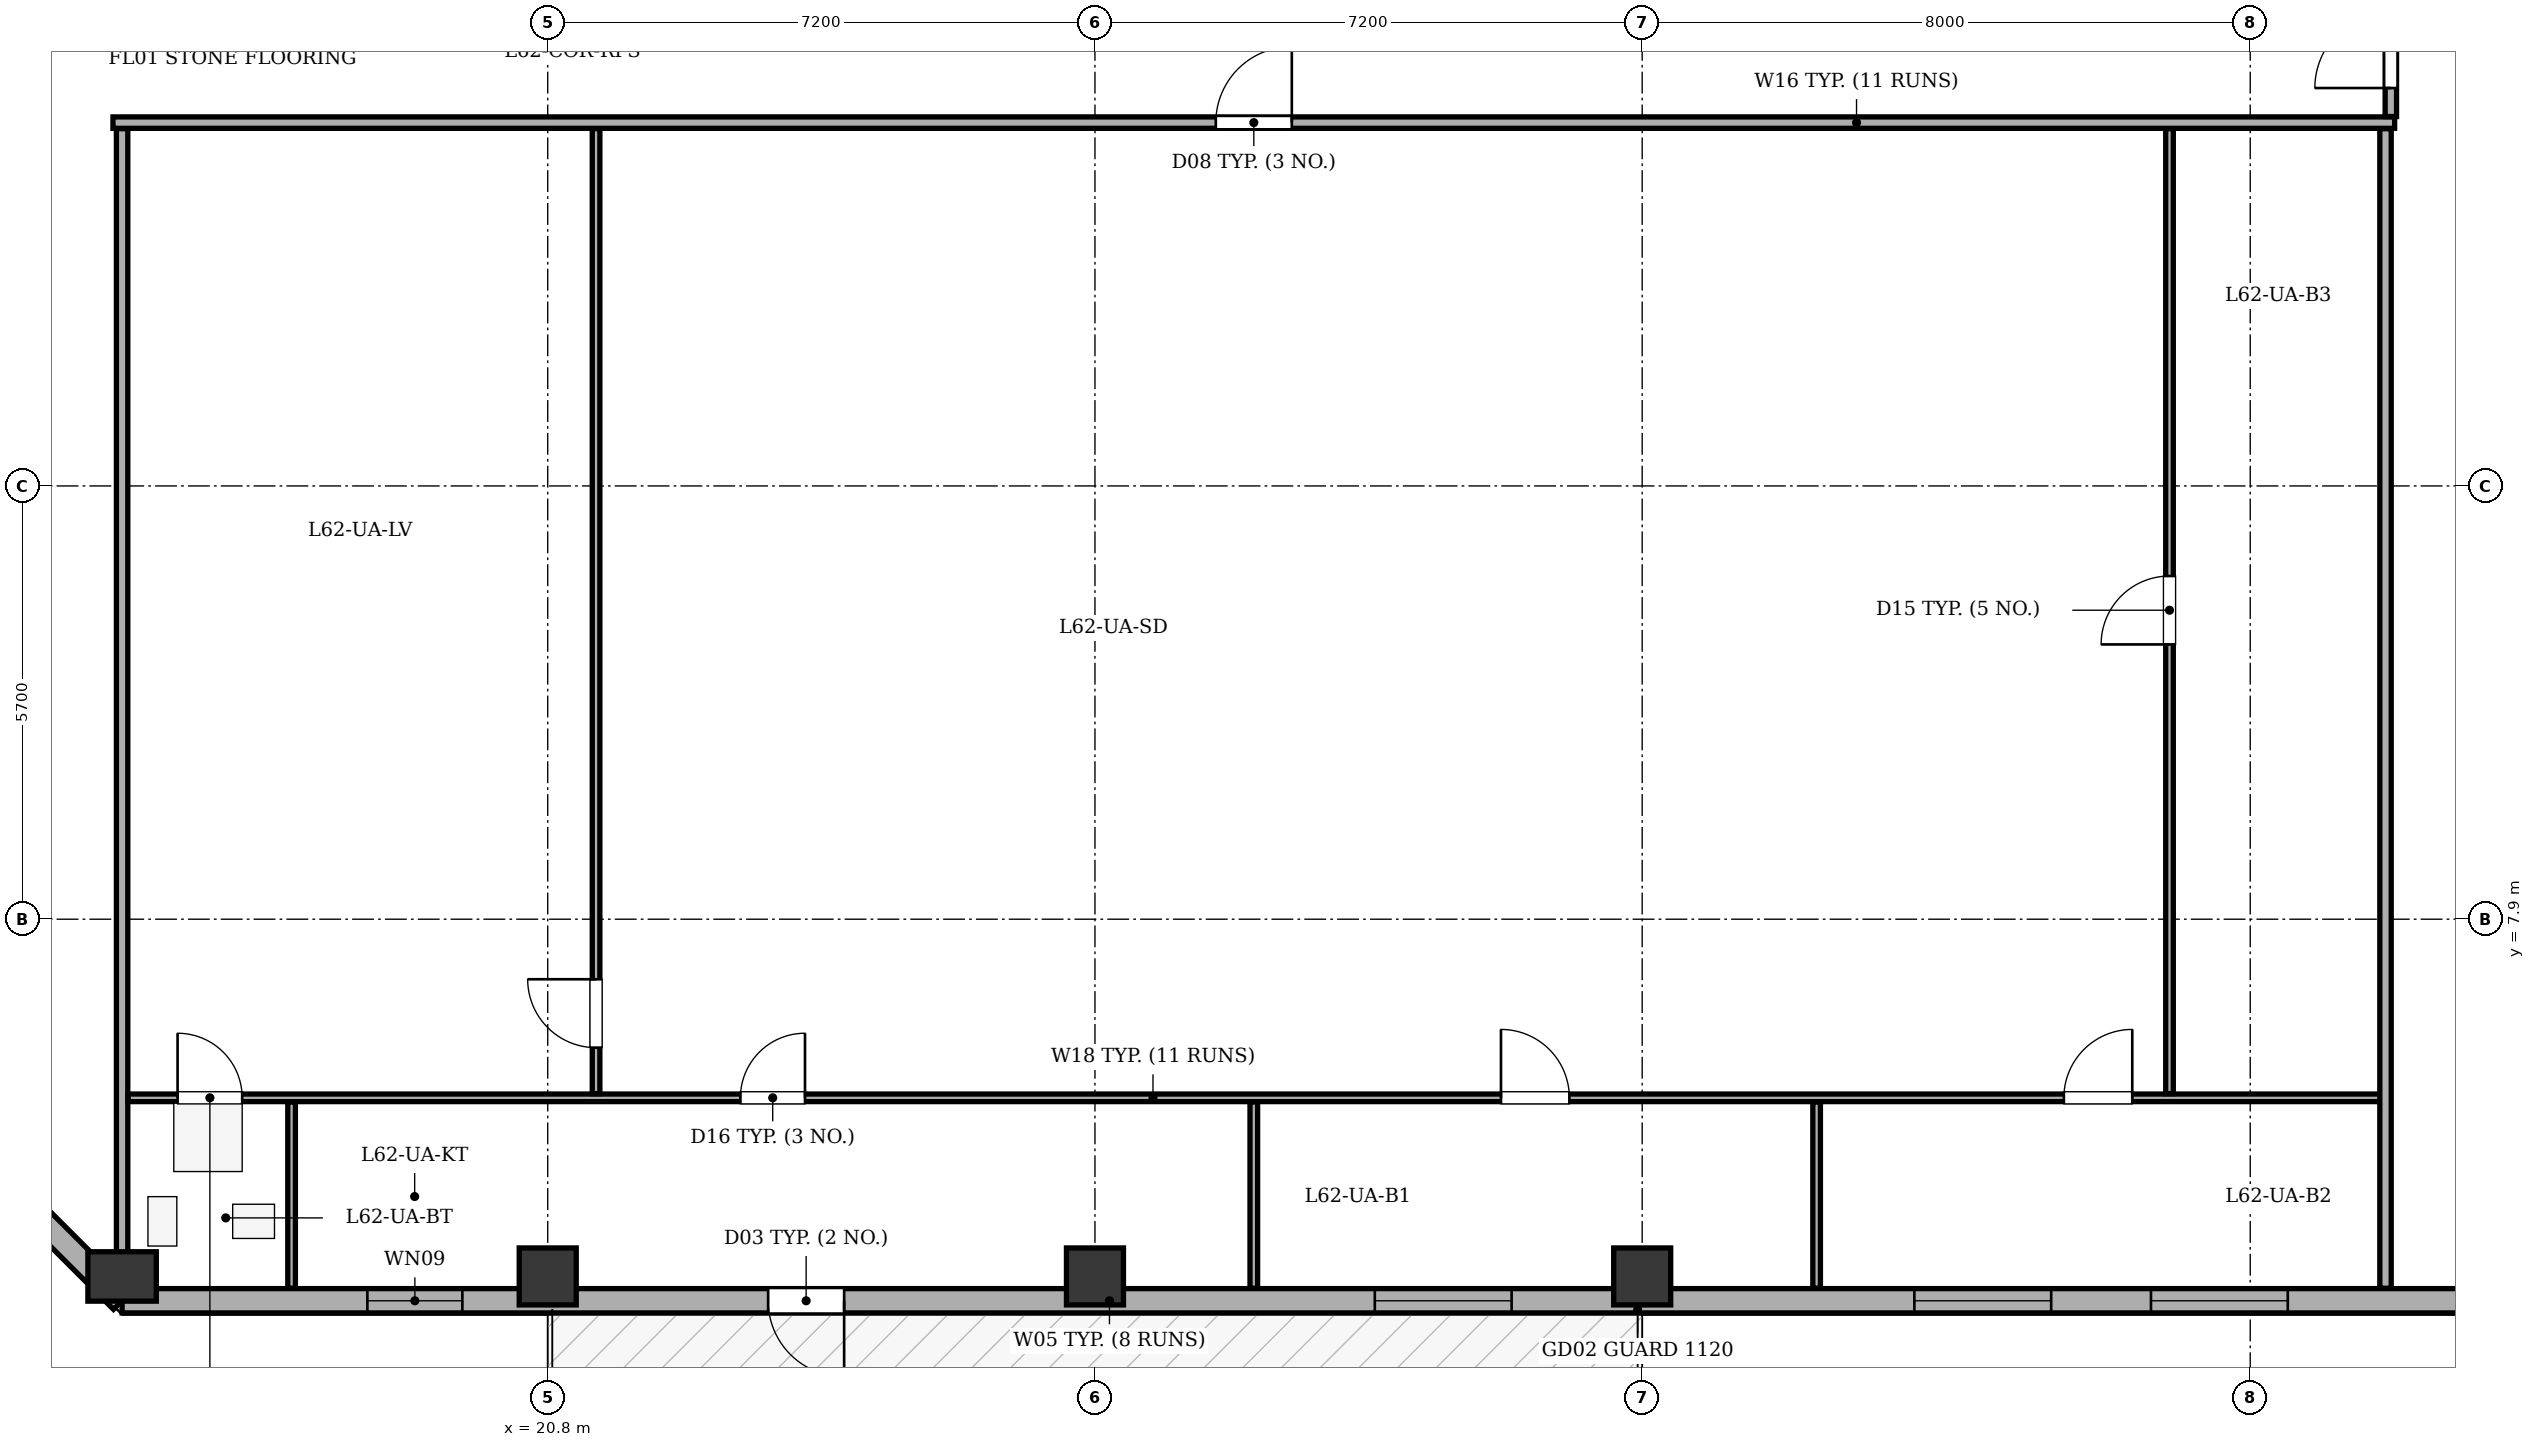
"""IFC4 building model, lengths in metres.
Left out: names, types, materials, properties, quantities, classifications, styles, units other than length and angle.
Written with IfcOpenShell. Run it as: python <this file> out.ifc"""

import sys

from ifc_helpers import new_model, si_unit, direction, frame, frame_2d, origin, origin_2d, place, context, subcontext, project, spatial, rectangle, extrude, element, fill, save


model = new_model("IFC4")
c1 = context("Model", 3, precision=1e-05, world=origin(), true_north=direction((0.0, 1.0)))
c2 = subcontext(c1, "Body", "Model", "MODEL_VIEW")
j1 = project(units=[si_unit("LENGTHUNIT", "METRE"), si_unit("PLANEANGLEUNIT", "RADIAN")], contexts=[c1])
p1 = place(None, origin())
s1 = spatial("IfcSite", under=j1, at=p1, CompositionType="ELEMENT")
p2 = place(p1, origin())
s2 = spatial("IfcBuilding", under=s1, at=p2, CompositionType="ELEMENT")
p3 = place(p2, frame((0.0, 0.0, 238.1)))
s3 = spatial("IfcBuildingStorey", under=s2, at=p3, CompositionType="ELEMENT", Elevation=238.1)
p4 = place(p3, frame((15.2, 3.2, 0.0), z_axis=(0.0, 0.0, 1.0), x_axis=(1.0, 0.0, 0.0)))
e1 = element("IfcColumn", 1, at=p4, inside=s3, PredefinedType="COLUMN", context=c2, shape_type="SweptSolid", body=[
    extrude(rectangle(XDim=0.65, YDim=0.9, at=origin_2d()), origin(), (0.0, 0.0, 1.0), 3.4),
])
for number, where, z_axis, x_axis in (
    (2, (20.8, 3.2, 0.0), (0.0, 0.0, 1.0), (1.0, 0.0, 0.0)),
    (3, (28.0, 3.2, 0.0), (0.0, 0.0, 1.0), (1.0, 0.0, 0.0)),
    (4, (35.2, 3.2, 0.0), (0.0, 0.0, 1.0), (1.0, 0.0, 0.0)),
):
    element("IfcColumn", number, at=place(p3, frame(where, z_axis=z_axis, x_axis=x_axis)), inside=s3, PredefinedType="COLUMN", context=c2, shape_type="SweptSolid", body=[
        extrude(rectangle(XDim=0.75, YDim=0.75, at=origin_2d()), origin(), (0.0, 0.0, 1.0), 3.4),
    ])
p5 = place(p3, frame((51.2, 2.88, 0.0), z_axis=(0.0, 0.0, 1.0), x_axis=(-1.0, 0.0, 0.0)))
e5 = element("IfcWall", 5, at=p5, inside=s3, PredefinedType="STANDARD", context=c2, shape_type="SweptSolid", body=[
    extrude(rectangle(XDim=36.0, YDim=0.32, at=frame_2d((18.0, 0.0))), origin(), (0.0, 0.0, 1.0), 2.725),
])
p6 = place(p5, frame((26.5, 0.0, 0.0)))
e6 = element("IfcOpeningElement", 6, at=p6, cuts=e5, PredefinedType="OPENING", context=c2, shape_type="SweptSolid", body=[
    extrude(rectangle(XDim=1.0, YDim=2.02, at=frame_2d((0.5, 1.01))), frame((0.0, 0.17, 0.0), z_axis=(0.0, -1.0, 0.0), x_axis=(1.0, 0.0, 0.0)), (0.0, 0.0, 1.0), 0.34),
])
p7 = place(p5, frame((2.31, 0.0, 0.75)))
e7 = element("IfcOpeningElement", 7, at=p7, cuts=e5, PredefinedType="OPENING", context=c2, shape_type="SweptSolid", body=[
    extrude(rectangle(XDim=1.8, YDim=1.7, at=frame_2d((0.9, 0.85))), frame((0.0, 0.17, 0.0), z_axis=(0.0, -1.0, 0.0), x_axis=(1.0, 0.0, 0.0)), (0.0, 0.0, 1.0), 0.34),
])
p8 = place(p5, frame((7.506, 0.0, 0.75)))
e8 = element("IfcOpeningElement", 8, at=p8, cuts=e5, PredefinedType="OPENING", context=c2, shape_type="SweptSolid", body=[
    extrude(rectangle(XDim=1.8, YDim=1.7, at=frame_2d((0.9, 0.85))), frame((0.0, 0.17, 0.0), z_axis=(0.0, -1.0, 0.0), x_axis=(1.0, 0.0, 0.0)), (0.0, 0.0, 1.0), 0.34),
])
p9 = place(p5, frame((10.619, 0.0, 0.75)))
e9 = element("IfcOpeningElement", 9, at=p9, cuts=e5, PredefinedType="OPENING", context=c2, shape_type="SweptSolid", body=[
    extrude(rectangle(XDim=1.8, YDim=1.7, at=frame_2d((0.9, 0.85))), frame((0.0, 0.17, 0.0), z_axis=(0.0, -1.0, 0.0), x_axis=(1.0, 0.0, 0.0)), (0.0, 0.0, 1.0), 0.34),
])
p10 = place(p5, frame((17.718, 0.0, 0.75)))
e10 = element("IfcOpeningElement", 10, at=p10, cuts=e5, PredefinedType="OPENING", context=c2, shape_type="SweptSolid", body=[
    extrude(rectangle(XDim=1.8, YDim=1.7, at=frame_2d((0.9, 0.85))), frame((0.0, 0.17, 0.0), z_axis=(0.0, -1.0, 0.0), x_axis=(1.0, 0.0, 0.0)), (0.0, 0.0, 1.0), 0.34),
])
p11 = place(p5, frame((31.523, 0.0, 0.75)))
e11 = element("IfcOpeningElement", 11, at=p11, cuts=e5, PredefinedType="OPENING", context=c2, shape_type="SweptSolid", body=[
    extrude(rectangle(XDim=1.25, YDim=1.7, at=frame_2d((0.625, 0.85))), frame((0.0, 0.17, 0.0), z_axis=(0.0, -1.0, 0.0), x_axis=(1.0, 0.0, 0.0)), (0.0, 0.0, 1.0), 0.34),
])
p12 = place(p3, frame((15.2, 2.88, 0.0), z_axis=(0.0, 0.0, 1.0), x_axis=(-0.707106781187, 0.707106781187, 0.0)))
e12 = element("IfcWall", 12, at=p12, inside=s3, PredefinedType="STANDARD", context=c2, shape_type="SweptSolid", body=[
    extrude(rectangle(XDim=6.11, YDim=0.32, at=frame_2d((3.055, 0.0))), origin(), (0.0, 0.0, 1.0), 2.725),
])
p13 = place(p12, frame((2.355, 0.0, 0.75)))
e13 = element("IfcOpeningElement", 13, at=p13, cuts=e12, PredefinedType="OPENING", context=c2, shape_type="SweptSolid", body=[
    extrude(rectangle(XDim=1.4, YDim=1.65, at=frame_2d((0.7, 0.825))), frame((0.0, 0.17, 0.0), z_axis=(0.0, -1.0, 0.0), x_axis=(1.0, 0.0, 0.0)), (0.0, 0.0, 1.0), 0.34),
])
p14 = place(p3, frame((15.08, 18.38, 0.0), z_axis=(0.0, 0.0, 1.0), x_axis=(1.0, 0.0, 0.0)))
e14 = element("IfcWall", 14, at=p14, inside=s3, PredefinedType="PARTITIONING", context=c2, shape_type="SweptSolid", body=[
    extrude(rectangle(XDim=30.02, YDim=0.15, at=frame_2d((15.01, 0.0))), origin(), (0.0, 0.0, 1.0), 3.1),
])
p15 = place(p14, frame((14.51, 0.0, 0.0)))
e15 = element("IfcOpeningElement", 15, at=p15, cuts=e14, PredefinedType="OPENING", context=c2, shape_type="SweptSolid", body=[
    extrude(rectangle(XDim=1.0, YDim=2.1, at=frame_2d((0.5, 1.05))), frame((0.0, 0.085, 0.0), z_axis=(0.0, -1.0, 0.0), x_axis=(1.0, 0.0, 0.0)), (0.0, 0.0, 1.0), 0.17),
])
p16 = place(p3, frame((15.2, 3.045, 0.0), z_axis=(0.0, 0.0, 1.0), x_axis=(0.0, 1.0, 0.0)))
e16 = element("IfcWall", 16, at=p16, inside=s3, PredefinedType="PARTITIONING", context=c2, shape_type="SweptSolid", body=[
    extrude(rectangle(XDim=15.255, YDim=0.15, at=frame_2d((7.627, 0.0))), origin(), (0.0, 0.0, 1.0), 3.1),
])
p17 = place(p3, frame((15.28, 5.55, 0.0), z_axis=(0.0, 0.0, 1.0), x_axis=(1.0, 0.0, 0.0)))
e17 = element("IfcWall", 17, at=p17, inside=s3, PredefinedType="PARTITIONING", context=c2, shape_type="SweptSolid", body=[
    extrude(rectangle(XDim=29.74, YDim=0.1, at=frame_2d((14.87, 0.0))), origin(), (0.0, 0.0, 1.0), 3.1),
])
p18 = place(p17, frame((0.65, 0.0, 0.0)))
e18 = element("IfcOpeningElement", 18, at=p18, cuts=e17, PredefinedType="OPENING", context=c2, shape_type="SweptSolid", body=[
    extrude(rectangle(XDim=0.85, YDim=2.05, at=frame_2d((0.425, 1.025))), frame((0.0, 0.06, 0.0), z_axis=(0.0, -1.0, 0.0), x_axis=(1.0, 0.0, 0.0)), (0.0, 0.0, 1.0), 0.12),
])
p19 = place(p17, frame((8.055, 0.0, 0.0)))
e19 = element("IfcOpeningElement", 19, at=p19, cuts=e17, PredefinedType="OPENING", context=c2, shape_type="SweptSolid", body=[
    extrude(rectangle(XDim=0.85, YDim=2.05, at=frame_2d((0.425, 1.025))), frame((0.0, 0.06, 0.0), z_axis=(0.0, -1.0, 0.0), x_axis=(1.0, 0.0, 0.0)), (0.0, 0.0, 1.0), 0.12),
])
p20 = place(p17, frame((18.062, 0.0, 0.0)))
e20 = element("IfcOpeningElement", 20, at=p20, cuts=e17, PredefinedType="OPENING", context=c2, shape_type="SweptSolid", body=[
    extrude(rectangle(XDim=0.9, YDim=2.05, at=frame_2d((0.45, 1.025))), frame((0.0, 0.06, 0.0), z_axis=(0.0, -1.0, 0.0), x_axis=(1.0, 0.0, 0.0)), (0.0, 0.0, 1.0), 0.12),
])
p21 = place(p17, frame((25.468, 0.0, 0.0)))
e21 = element("IfcOpeningElement", 21, at=p21, cuts=e17, PredefinedType="OPENING", context=c2, shape_type="SweptSolid", body=[
    extrude(rectangle(XDim=0.9, YDim=2.05, at=frame_2d((0.45, 1.025))), frame((0.0, 0.06, 0.0), z_axis=(0.0, -1.0, 0.0), x_axis=(1.0, 0.0, 0.0)), (0.0, 0.0, 1.0), 0.12),
])
p22 = place(p3, frame((42.138, 5.605, 0.0), z_axis=(0.0, 0.0, 1.0), x_axis=(0.0, 1.0, 0.0)))
e22 = element("IfcWall", 22, at=p22, inside=s3, PredefinedType="PARTITIONING", context=c2, shape_type="SweptSolid", body=[
    extrude(rectangle(XDim=12.695, YDim=0.1, at=frame_2d((6.348, 0.0))), origin(), (0.0, 0.0, 1.0), 2.725),
])
p23 = place(p22, frame((5.91, 0.0, 0.0)))
e23 = element("IfcOpeningElement", 23, at=p23, cuts=e22, PredefinedType="OPENING", context=c2, shape_type="SweptSolid", body=[
    extrude(rectangle(XDim=0.9, YDim=2.05, at=frame_2d((0.45, 1.025))), frame((0.0, 0.06, 0.0), z_axis=(0.0, -1.0, 0.0), x_axis=(1.0, 0.0, 0.0)), (0.0, 0.0, 1.0), 0.12),
])
p24 = place(p3, frame((21.436, 5.605, 0.0), z_axis=(0.0, 0.0, 1.0), x_axis=(0.0, 1.0, 0.0)))
e24 = element("IfcWall", 24, at=p24, inside=s3, PredefinedType="PARTITIONING", context=c2, shape_type="SweptSolid", body=[
    extrude(rectangle(XDim=12.695, YDim=0.1, at=frame_2d((6.348, 0.0))), origin(), (0.0, 0.0, 1.0), 3.1),
])
p25 = place(p24, frame((0.605, 0.0, 0.0)))
e25 = element("IfcOpeningElement", 25, at=p25, cuts=e24, PredefinedType="OPENING", context=c2, shape_type="SweptSolid", body=[
    extrude(rectangle(XDim=0.9, YDim=2.05, at=frame_2d((0.45, 1.025))), frame((0.0, 0.06, 0.0), z_axis=(0.0, -1.0, 0.0), x_axis=(1.0, 0.0, 0.0)), (0.0, 0.0, 1.0), 0.12),
])
for number, where, z_axis, x_axis in (
    (26, (17.43, 3.045, 0.0), (0.0, 0.0, 1.0), (0.0, 1.0, 0.0)),
    (27, (30.09, 3.045, 0.0), (0.0, 0.0, 1.0), (0.0, 1.0, 0.0)),
    (28, (37.495, 3.045, 0.0), (0.0, 0.0, 1.0), (0.0, 1.0, 0.0)),
):
    element("IfcWall", number, at=place(p3, frame(where, z_axis=z_axis, x_axis=x_axis)), inside=s3, PredefinedType="PARTITIONING", context=c2, shape_type="SweptSolid", body=[
        extrude(rectangle(XDim=2.45, YDim=0.1, at=frame_2d((1.225, 0.0))), origin(), (0.0, 0.0, 1.0), 3.1),
    ])
p26 = place(p3, frame((44.98, 3.045, 0.0), z_axis=(0.0, 0.0, 1.0), x_axis=(0.0, 1.0, 0.0)))
e29 = element("IfcWall", 29, at=p26, inside=s3, PredefinedType="PARTITIONING", context=c2, shape_type="SweptSolid", body=[
    extrude(rectangle(XDim=15.255, YDim=0.15, at=frame_2d((7.627, 0.0))), origin(), (0.0, 0.0, 1.0), 2.725),
])
p27 = place(p3, frame((45.05, 18.46, 0.0), z_axis=(0.0, 0.0, 1.0), x_axis=(0.0, 1.0, 0.0)))
e30 = element("IfcWall", 30, at=p27, inside=s3, PredefinedType="PARTITIONING", context=c2, shape_type="SweptSolid", body=[
    extrude(rectangle(XDim=1.79, YDim=0.15, at=frame_2d((0.895, 0.0))), origin(), (0.0, 0.0, 1.0), 2.725),
])
p28 = place(p27, frame((0.375, 0.0, 0.0)))
e31 = element("IfcOpeningElement", 31, at=p28, cuts=e30, PredefinedType="OPENING", context=c2, shape_type="SweptSolid", body=[
    extrude(rectangle(XDim=1.0, YDim=2.1, at=frame_2d((0.5, 1.05))), frame((0.0, 0.085, 0.0), z_axis=(0.0, -1.0, 0.0), x_axis=(1.0, 0.0, 0.0)), (0.0, 0.0, 1.0), 0.17),
])
p29 = place(p6, origin())
e32 = element("IfcDoor", 32, at=p29, inside=s3, OperationType="SINGLE_SWING_LEFT", PredefinedType="DOOR", context=c2, shape_type="SweptSolid", body=[
    extrude(rectangle(XDim=1.0, YDim=2.02, at=frame_2d((0.5, 1.01))), frame((0.0, 0.025, 0.0), z_axis=(0.0, -1.0, 0.0), x_axis=(1.0, 0.0, 0.0)), (0.0, 0.0, 1.0), 0.05),
])
fill(e6, e32)
p30 = place(p8, origin())
e33 = element("IfcWindow", 33, at=p30, inside=s3, PartitioningType="SINGLE_PANEL", PredefinedType="WINDOW", context=c2, shape_type="SweptSolid", body=[
    extrude(rectangle(XDim=1.8, YDim=1.7, at=frame_2d((0.9, 0.85))), frame((0.0, -0.01, 0.0), z_axis=(0.0, -1.0, 0.0), x_axis=(1.0, 0.0, 0.0)), (0.0, 0.0, 1.0), 0.06),
])
fill(e8, e33)
p31 = place(p9, origin())
e34 = element("IfcWindow", 34, at=p31, inside=s3, PartitioningType="SINGLE_PANEL", PredefinedType="WINDOW", context=c2, shape_type="SweptSolid", body=[
    extrude(rectangle(XDim=1.8, YDim=1.7, at=frame_2d((0.9, 0.85))), frame((0.0, -0.01, 0.0), z_axis=(0.0, -1.0, 0.0), x_axis=(1.0, 0.0, 0.0)), (0.0, 0.0, 1.0), 0.06),
])
fill(e9, e34)
p32 = place(p10, origin())
e35 = element("IfcWindow", 35, at=p32, inside=s3, PartitioningType="SINGLE_PANEL", PredefinedType="WINDOW", context=c2, shape_type="SweptSolid", body=[
    extrude(rectangle(XDim=1.8, YDim=1.7, at=frame_2d((0.9, 0.85))), frame((0.0, -0.01, 0.0), z_axis=(0.0, -1.0, 0.0), x_axis=(1.0, 0.0, 0.0)), (0.0, 0.0, 1.0), 0.06),
])
fill(e10, e35)
p33 = place(p11, origin())
e36 = element("IfcWindow", 36, at=p33, inside=s3, PartitioningType="SINGLE_PANEL", PredefinedType="WINDOW", context=c2, shape_type="SweptSolid", body=[
    extrude(rectangle(XDim=1.25, YDim=1.7, at=frame_2d((0.625, 0.85))), frame((0.0, -0.01, 0.0), z_axis=(0.0, -1.0, 0.0), x_axis=(1.0, 0.0, 0.0)), (0.0, 0.0, 1.0), 0.06),
])
fill(e11, e36)
p34 = place(p15, origin())
e37 = element("IfcDoor", 37, at=p34, inside=s3, OperationType="SINGLE_SWING_RIGHT", PredefinedType="DOOR", context=c2, shape_type="SweptSolid", body=[
    extrude(rectangle(XDim=1.0, YDim=2.1, at=frame_2d((0.5, 1.05))), frame((0.0, 0.025, 0.0), z_axis=(0.0, -1.0, 0.0), x_axis=(1.0, 0.0, 0.0)), (0.0, 0.0, 1.0), 0.05),
])
fill(e15, e37)
p35 = place(p23, origin())
e38 = element("IfcDoor", 38, at=p35, inside=s3, OperationType="SINGLE_SWING_LEFT", PredefinedType="DOOR", context=c2, shape_type="SweptSolid", body=[
    extrude(rectangle(XDim=0.9, YDim=2.05, at=frame_2d((0.45, 1.025))), frame((0.0, 0.025, 0.0), z_axis=(0.0, -1.0, 0.0), x_axis=(1.0, 0.0, 0.0)), (0.0, 0.0, 1.0), 0.05),
])
fill(e23, e38)
p36 = place(p25, origin())
e39 = element("IfcDoor", 39, at=p36, inside=s3, OperationType="SINGLE_SWING_RIGHT", PredefinedType="DOOR", context=c2, shape_type="SweptSolid", body=[
    extrude(rectangle(XDim=0.9, YDim=2.05, at=frame_2d((0.45, 1.025))), frame((0.0, 0.025, 0.0), z_axis=(0.0, -1.0, 0.0), x_axis=(1.0, 0.0, 0.0)), (0.0, 0.0, 1.0), 0.05),
])
fill(e25, e39)
p37 = place(p18, origin())
e40 = element("IfcDoor", 40, at=p37, inside=s3, OperationType="SINGLE_SWING_LEFT", PredefinedType="DOOR", context=c2, shape_type="SweptSolid", body=[
    extrude(rectangle(XDim=0.85, YDim=2.05, at=frame_2d((0.425, 1.025))), frame((0.0, 0.025, 0.0), z_axis=(0.0, -1.0, 0.0), x_axis=(1.0, 0.0, 0.0)), (0.0, 0.0, 1.0), 0.05),
])
fill(e18, e40)
p38 = place(p19, origin())
e41 = element("IfcDoor", 41, at=p38, inside=s3, OperationType="SINGLE_SWING_RIGHT", PredefinedType="DOOR", context=c2, shape_type="SweptSolid", body=[
    extrude(rectangle(XDim=0.85, YDim=2.05, at=frame_2d((0.425, 1.025))), frame((0.0, 0.025, 0.0), z_axis=(0.0, -1.0, 0.0), x_axis=(1.0, 0.0, 0.0)), (0.0, 0.0, 1.0), 0.05),
])
fill(e19, e41)
p39 = place(p20, origin())
e42 = element("IfcDoor", 42, at=p39, inside=s3, OperationType="SINGLE_SWING_LEFT", PredefinedType="DOOR", context=c2, shape_type="SweptSolid", body=[
    extrude(rectangle(XDim=0.9, YDim=2.05, at=frame_2d((0.45, 1.025))), frame((0.0, 0.025, 0.0), z_axis=(0.0, -1.0, 0.0), x_axis=(1.0, 0.0, 0.0)), (0.0, 0.0, 1.0), 0.05),
])
fill(e20, e42)
p40 = place(p21, origin())
e43 = element("IfcDoor", 43, at=p40, inside=s3, OperationType="SINGLE_SWING_RIGHT", PredefinedType="DOOR", context=c2, shape_type="SweptSolid", body=[
    extrude(rectangle(XDim=0.9, YDim=2.05, at=frame_2d((0.45, 1.025))), frame((0.0, 0.025, 0.0), z_axis=(0.0, -1.0, 0.0), x_axis=(1.0, 0.0, 0.0)), (0.0, 0.0, 1.0), 0.05),
])
fill(e21, e43)
p41 = place(p28, origin())
e44 = element("IfcDoor", 44, at=p41, inside=s3, OperationType="SINGLE_SWING_LEFT", PredefinedType="DOOR", context=c2, shape_type="SweptSolid", body=[
    extrude(rectangle(XDim=1.0, YDim=2.1, at=frame_2d((0.5, 1.05))), frame((0.0, 0.025, 0.0), z_axis=(0.0, -1.0, 0.0), x_axis=(1.0, 0.0, 0.0)), (0.0, 0.0, 1.0), 0.05),
])
fill(e31, e44)
save(model, sys.argv[1])
